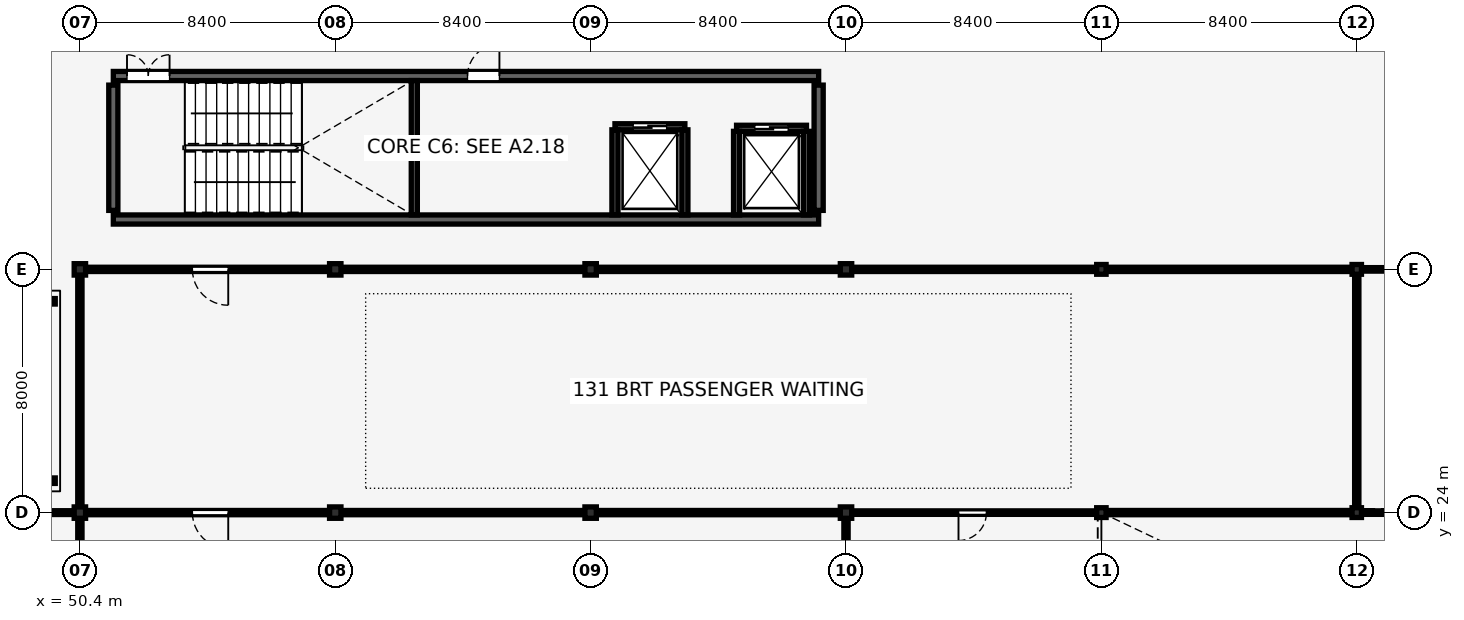
"""IFC4 building model, lengths in metres.
Left out: names, types, materials, properties, quantities, classifications, styles, units other than length and angle.
Written with IfcOpenShell. Run it as: python <this file> out.ifc"""

import sys

from ifc_helpers import new_model, si_unit, direction, frame, frame_2d, origin, origin_2d, place, context, subcontext, project, spatial, rectangle, hollow_rectangle, i_section, extrude, element, fill, save


model = new_model("IFC4")
c1 = context("Model", 3, precision=1e-05, world=origin(), true_north=direction((0.0, 1.0)))
c2 = subcontext(c1, "Body", "Model", "MODEL_VIEW")
j1 = project(units=[si_unit("LENGTHUNIT", "METRE"), si_unit("PLANEANGLEUNIT", "RADIAN")], contexts=[c1])
p1 = place(None, origin())
s1 = spatial("IfcSite", under=j1, at=p1, CompositionType="ELEMENT")
p2 = place(p1, origin())
s2 = spatial("IfcBuilding", under=s1, at=p2, CompositionType="ELEMENT")
p3 = place(p2, frame((0.0, 0.0, 5.44)))
s3 = spatial("IfcBuildingStorey", under=s2, at=p3, CompositionType="ELEMENT", Elevation=5.44)
p4 = place(p3, frame((51.5, 33.64, 0.0), z_axis=(0.0, 0.0, 1.0), x_axis=(1.0, 0.0, 0.0)))
e1 = element("IfcWall", 1, at=p4, inside=s3, PredefinedType="SHEAR", context=c2, shape_type="SweptSolid", body=[
    extrude(rectangle(XDim=23.2, YDim=0.3, at=frame_2d((11.6, 0.0))), origin(), (0.0, 0.0, 1.0), 3.8),
])
p5 = place(p3, frame((51.5, 38.36, 0.0), z_axis=(0.0, 0.0, 1.0), x_axis=(1.0, 0.0, 0.0)))
e2 = element("IfcWall", 2, at=p5, inside=s3, PredefinedType="SHEAR", context=c2, shape_type="SweptSolid", body=[
    extrude(rectangle(XDim=23.2, YDim=0.3, at=frame_2d((11.6, 0.0))), origin(), (0.0, 0.0, 1.0), 3.8),
])
p6 = place(p5, frame((0.45, 0.0, 0.0), z_axis=(0.0, 0.0, 1.0), x_axis=(1.0, 0.0, 0.0)))
e3 = element("IfcOpeningElement", 3, at=p6, cuts=e2, PredefinedType="OPENING", context=c2, shape_type="SweptSolid", body=[
    extrude(rectangle(XDim=1.4, YDim=2.15, at=frame_2d((0.7, 1.075))), frame((0.0, 0.16, 0.0), z_axis=(0.0, -1.0, 0.0), x_axis=(1.0, 0.0, 0.0)), (0.0, 0.0, 1.0), 0.32),
])
p7 = place(p5, frame((11.65, 0.0, 0.0), z_axis=(0.0, 0.0, 1.0), x_axis=(1.0, 0.0, 0.0)))
e4 = element("IfcOpeningElement", 4, at=p7, cuts=e2, PredefinedType="OPENING", context=c2, shape_type="SweptSolid", body=[
    extrude(rectangle(XDim=1.05, YDim=2.15, at=frame_2d((0.525, 1.075))), frame((0.0, 0.16, 0.0), z_axis=(0.0, -1.0, 0.0), x_axis=(1.0, 0.0, 0.0)), (0.0, 0.0, 1.0), 0.32),
])
for number, where, z_axis, x_axis in (
    (5, (51.5, 33.94, 0.0), (0.0, 0.0, 1.0), (0.0, 1.0, 0.0)),
    (6, (74.7, 33.94, 0.0), (0.0, 0.0, 1.0), (0.0, 1.0, 0.0)),
):
    element("IfcWall", number, at=place(p3, frame(where, z_axis=z_axis, x_axis=x_axis)), inside=s3, PredefinedType="SHEAR", context=c2, shape_type="SweptSolid", body=[
        extrude(rectangle(XDim=4.12, YDim=0.3, at=frame_2d((2.06, 0.0))), origin(), (0.0, 0.0, 1.0), 3.8),
    ])
for number, where, z_axis, x_axis in (
    (7, (50.4, 24.0, 0.0), (0.0, 0.0, 1.0), (1.0, 0.0, 0.0)),
    (8, (50.4, 32.0, 0.0), (0.0, 0.0, 1.0), (1.0, 0.0, 0.0)),
    (9, (58.8, 24.0, 0.0), (0.0, 0.0, 1.0), (1.0, 0.0, 0.0)),
    (10, (58.8, 32.0, 0.0), (0.0, 0.0, 1.0), (1.0, 0.0, 0.0)),
    (11, (67.2, 24.0, 0.0), (0.0, 0.0, 1.0), (1.0, 0.0, 0.0)),
    (12, (67.2, 32.0, 0.0), (0.0, 0.0, 1.0), (1.0, 0.0, 0.0)),
    (13, (75.6, 24.0, 0.0), (0.0, 0.0, 1.0), (1.0, 0.0, 0.0)),
    (14, (75.6, 32.0, 0.0), (0.0, 0.0, 1.0), (1.0, 0.0, 0.0)),
):
    element("IfcColumn", number, at=place(p3, frame(where, z_axis=z_axis, x_axis=x_axis)), inside=s3, PredefinedType="COLUMN", context=c2, shape_type="SweptSolid", body=[
        extrude(i_section(OverallWidth=0.375, OverallDepth=0.375, WebThickness=0.017, FlangeThickness=0.027, FilletRadius=0.015, at=origin_2d()), origin(), (0.0, 0.0, 1.0), 3.8),
    ])
for number, where, z_axis, x_axis in (
    (15, (84.0, 24.0, 0.0), (0.0, 0.0, 1.0), (1.0, 0.0, 0.0)),
    (16, (84.0, 32.0, 0.0), (0.0, 0.0, 1.0), (1.0, 0.0, 0.0)),
    (17, (92.4, 24.0, 0.0), (0.0, 0.0, 1.0), (1.0, 0.0, 0.0)),
    (18, (92.4, 32.0, 0.0), (0.0, 0.0, 1.0), (1.0, 0.0, 0.0)),
):
    element("IfcColumn", number, at=place(p3, frame(where, z_axis=z_axis, x_axis=x_axis)), inside=s3, PredefinedType="COLUMN", context=c2, shape_type="SweptSolid", body=[
        extrude(i_section(OverallWidth=0.309, OverallDepth=0.321, WebThickness=0.014, FlangeThickness=0.022, FilletRadius=0.015, at=origin_2d()), origin(), (0.0, 0.0, 1.0), 3.8),
    ])
p8 = place(p3, frame((61.4, 33.79, 0.0), z_axis=(0.0, 0.0, 1.0), x_axis=(0.0, 1.0, 0.0)))
e19 = element("IfcWall", 19, at=p8, inside=s3, PredefinedType="SHEAR", context=c2, shape_type="SweptSolid", body=[
    extrude(rectangle(XDim=4.42, YDim=0.2, at=frame_2d((2.21, 0.0))), origin(), (0.0, 0.0, 1.0), 3.8),
])
p9 = place(p3, frame((68.0, 36.69, 0.0), z_axis=(0.0, 0.0, 1.0), x_axis=(1.0, 0.0, 0.0)))
e20 = element("IfcWall", 20, at=p9, inside=s3, PredefinedType="SHEAR", context=c2, shape_type="SweptSolid", body=[
    extrude(rectangle(XDim=2.3, YDim=0.2, at=frame_2d((1.15, 0.0))), origin(), (0.0, 0.0, 1.0), 3.8),
])
p10 = place(p9, frame((0.6, 0.0, 0.0), z_axis=(0.0, 0.0, 1.0), x_axis=(1.0, 0.0, 0.0)))
e21 = element("IfcOpeningElement", 21, at=p10, cuts=e20, PredefinedType="OPENING", context=c2, shape_type="SweptSolid", body=[
    extrude(rectangle(XDim=1.1, YDim=2.15, at=frame_2d((0.55, 1.075))), frame((0.0, 0.11, 0.0), z_axis=(0.0, -1.0, 0.0), x_axis=(1.0, 0.0, 0.0)), (0.0, 0.0, 1.0), 0.22),
])
for number, where, z_axis, x_axis in (
    (22, (68.0, 33.79, 0.0), (0.0, 0.0, 1.0), (0.0, 1.0, 0.0)),
    (23, (70.3, 33.79, 0.0), (0.0, 0.0, 1.0), (0.0, 1.0, 0.0)),
):
    element("IfcWall", number, at=place(p3, frame(where, z_axis=z_axis, x_axis=x_axis)), inside=s3, PredefinedType="SHEAR", context=c2, shape_type="SweptSolid", body=[
        extrude(rectangle(XDim=2.8, YDim=0.2, at=frame_2d((1.4, 0.0))), origin(), (0.0, 0.0, 1.0), 3.8),
    ])
p11 = place(p3, frame((72.0, 36.64, 0.0), z_axis=(0.0, 0.0, 1.0), x_axis=(1.0, 0.0, 0.0)))
e24 = element("IfcWall", 24, at=p11, inside=s3, PredefinedType="SHEAR", context=c2, shape_type="SweptSolid", body=[
    extrude(rectangle(XDim=2.3, YDim=0.2, at=frame_2d((1.15, 0.0))), origin(), (0.0, 0.0, 1.0), 3.8),
])
p12 = place(p11, frame((0.6, 0.0, 0.0), z_axis=(0.0, 0.0, 1.0), x_axis=(1.0, 0.0, 0.0)))
e25 = element("IfcOpeningElement", 25, at=p12, cuts=e24, PredefinedType="OPENING", context=c2, shape_type="SweptSolid", body=[
    extrude(rectangle(XDim=1.1, YDim=2.15, at=frame_2d((0.55, 1.075))), frame((0.0, 0.11, 0.0), z_axis=(0.0, -1.0, 0.0), x_axis=(1.0, 0.0, 0.0)), (0.0, 0.0, 1.0), 0.22),
])
for number, where, z_axis, x_axis in (
    (26, (72.0, 33.79, 0.0), (0.0, 0.0, 1.0), (0.0, 1.0, 0.0)),
    (27, (74.3, 33.79, 0.0), (0.0, 0.0, 1.0), (0.0, 1.0, 0.0)),
):
    element("IfcWall", number, at=place(p3, frame(where, z_axis=z_axis, x_axis=x_axis)), inside=s3, PredefinedType="SHEAR", context=c2, shape_type="SweptSolid", body=[
        extrude(rectangle(XDim=2.75, YDim=0.2, at=frame_2d((1.375, 0.0))), origin(), (0.0, 0.0, 1.0), 3.8),
    ])
for number, where, z_axis, x_axis in (
    (28, (49.5, 25.05, 0.002), (0.0, 0.0, 1.0), (1.0, 0.0, 0.0)),
    (29, (49.5, 30.95, 0.002), (0.0, 0.0, 1.0), (1.0, 0.0, 0.0)),
):
    element("IfcColumn", number, at=place(p3, frame(where, z_axis=z_axis, x_axis=x_axis)), inside=s3, PredefinedType="COLUMN", context=c2, shape_type="SweptSolid", body=[
        extrude(hollow_rectangle(XDim=0.18, YDim=0.18, WallThickness=0.008, InnerFilletRadius=0.012, OuterFilletRadius=0.02, at=origin_2d()), origin(), (0.0, 0.0, 1.0), 3.794),
    ])
p13 = place(p3, frame((50.577, 32.0, 0.0), z_axis=(0.0, 0.0, 1.0), x_axis=(1.0, 0.0, 0.0)))
e30 = element("IfcWall", 30, at=p13, inside=s3, PredefinedType="PARTITIONING", context=c2, shape_type="SweptSolid", body=[
    extrude(rectangle(XDim=8.045, YDim=0.14, at=frame_2d((4.023, 0.0))), origin(), (0.0, 0.0, 1.0), 3.26),
])
p14 = place(p13, frame((4.703, 0.0, 0.0), z_axis=(0.0, 0.0, 1.0), x_axis=(-1.0, 0.0, 0.0)))
e31 = element("IfcOpeningElement", 31, at=p14, cuts=e30, PredefinedType="OPENING", context=c2, shape_type="SweptSolid", body=[
    extrude(rectangle(XDim=1.18, YDim=2.22, at=frame_2d((0.59, 1.11))), frame((0.0, 0.08, 0.0), z_axis=(0.0, -1.0, 0.0), x_axis=(1.0, 0.0, 0.0)), (0.0, 0.0, 1.0), 0.16),
])
p15 = place(p3, frame((92.545, 32.0, 0.0), z_axis=(0.0, 0.0, 1.0), x_axis=(1.0, 0.0, 0.0)))
e32 = element("IfcWall", 32, at=p15, inside=s3, PredefinedType="PARTITIONING", context=c2, shape_type="SweptSolid", body=[
    extrude(rectangle(XDim=8.111, YDim=0.115, at=frame_2d((4.055, 0.0))), origin(), (0.0, 0.0, 1.0), 3.26),
])
p16 = place(p15, frame((4.475, 0.0, 0.0), z_axis=(0.0, 0.0, 1.0), x_axis=(-1.0, 0.0, 0.0)))
e33 = element("IfcOpeningElement", 33, at=p16, cuts=e32, PredefinedType="OPENING", context=c2, shape_type="SweptSolid", body=[
    extrude(rectangle(XDim=0.92, YDim=2.12, at=frame_2d((0.46, 1.06))), frame((0.0, 0.067, 0.0), z_axis=(0.0, -1.0, 0.0), x_axis=(1.0, 0.0, 0.0)), (0.0, 0.0, 1.0), 0.135),
])
p17 = place(p3, frame((50.577, 24.0, 0.0), z_axis=(0.0, 0.0, 1.0), x_axis=(1.0, 0.0, 0.0)))
e34 = element("IfcWall", 34, at=p17, inside=s3, PredefinedType="PARTITIONING", context=c2, shape_type="SweptSolid", body=[
    extrude(rectangle(XDim=8.045, YDim=0.14, at=frame_2d((4.023, 0.0))), origin(), (0.0, 0.0, 1.0), 3.26),
])
p18 = place(p17, frame((4.703, 0.0, 0.0), z_axis=(0.0, 0.0, 1.0), x_axis=(-1.0, 0.0, 0.0)))
e35 = element("IfcOpeningElement", 35, at=p18, cuts=e34, PredefinedType="OPENING", context=c2, shape_type="SweptSolid", body=[
    extrude(rectangle(XDim=1.18, YDim=2.22, at=frame_2d((0.59, 1.11))), frame((0.0, 0.08, 0.0), z_axis=(0.0, -1.0, 0.0), x_axis=(1.0, 0.0, 0.0)), (0.0, 0.0, 1.0), 0.16),
])
p19 = place(p3, frame((75.777, 24.0, 0.0), z_axis=(0.0, 0.0, 1.0), x_axis=(1.0, 0.0, 0.0)))
e36 = element("IfcWall", 36, at=p19, inside=s3, PredefinedType="PARTITIONING", context=c2, shape_type="SweptSolid", body=[
    extrude(rectangle(XDim=8.078, YDim=0.115, at=frame_2d((4.039, 0.0))), origin(), (0.0, 0.0, 1.0), 3.26),
])
p20 = place(p19, frame((4.443, 0.0, 0.0), z_axis=(0.0, 0.0, 1.0), x_axis=(-1.0, 0.0, 0.0)))
e37 = element("IfcOpeningElement", 37, at=p20, cuts=e36, PredefinedType="OPENING", context=c2, shape_type="SweptSolid", body=[
    extrude(rectangle(XDim=0.92, YDim=2.12, at=frame_2d((0.46, 1.06))), frame((0.0, 0.067, 0.0), z_axis=(0.0, -1.0, 0.0), x_axis=(1.0, 0.0, 0.0)), (0.0, 0.0, 1.0), 0.135),
])
for number, where, z_axis, x_axis in (
    (38, (58.977, 32.0, 0.0), (0.0, 0.0, 1.0), (1.0, 0.0, 0.0)),
    (39, (67.377, 32.0, 0.0), (0.0, 0.0, 1.0), (1.0, 0.0, 0.0)),
):
    element("IfcWall", number, at=place(p3, frame(where, z_axis=z_axis, x_axis=x_axis)), inside=s3, PredefinedType="PARTITIONING", context=c2, shape_type="SweptSolid", body=[
        extrude(rectangle(XDim=8.045, YDim=0.14, at=frame_2d((4.023, 0.0))), origin(), (0.0, 0.0, 1.0), 3.26),
    ])
p21 = place(p3, frame((75.777, 32.0, 0.0), z_axis=(0.0, 0.0, 1.0), x_axis=(1.0, 0.0, 0.0)))
e40 = element("IfcWall", 40, at=p21, inside=s3, PredefinedType="PARTITIONING", context=c2, shape_type="SweptSolid", body=[
    extrude(rectangle(XDim=8.078, YDim=0.14, at=frame_2d((4.039, 0.0))), origin(), (0.0, 0.0, 1.0), 3.26),
])
p22 = place(p3, frame((84.145, 32.0, 0.0), z_axis=(0.0, 0.0, 1.0), x_axis=(1.0, 0.0, 0.0)))
e41 = element("IfcWall", 41, at=p22, inside=s3, PredefinedType="PARTITIONING", context=c2, shape_type="SweptSolid", body=[
    extrude(rectangle(XDim=8.111, YDim=0.14, at=frame_2d((4.055, 0.0))), origin(), (0.0, 0.0, 1.0), 3.26),
])
for number, where, z_axis, x_axis in (
    (42, (58.977, 24.0, 0.0), (0.0, 0.0, 1.0), (1.0, 0.0, 0.0)),
    (43, (67.377, 24.0, 0.0), (0.0, 0.0, 1.0), (1.0, 0.0, 0.0)),
):
    element("IfcWall", number, at=place(p3, frame(where, z_axis=z_axis, x_axis=x_axis)), inside=s3, PredefinedType="PARTITIONING", context=c2, shape_type="SweptSolid", body=[
        extrude(rectangle(XDim=8.045, YDim=0.14, at=frame_2d((4.023, 0.0))), origin(), (0.0, 0.0, 1.0), 3.26),
    ])
p23 = place(p3, frame((84.145, 24.0, 0.0), z_axis=(0.0, 0.0, 1.0), x_axis=(1.0, 0.0, 0.0)))
e44 = element("IfcWall", 44, at=p23, inside=s3, PredefinedType="PARTITIONING", context=c2, shape_type="SweptSolid", body=[
    extrude(rectangle(XDim=8.111, YDim=0.14, at=frame_2d((4.055, 0.0))), origin(), (0.0, 0.0, 1.0), 3.26),
])
p24 = place(p3, frame((50.4, 24.177, 0.0), z_axis=(0.0, 0.0, 1.0), x_axis=(0.0, 1.0, 0.0)))
e45 = element("IfcWall", 45, at=p24, inside=s3, PredefinedType="PARTITIONING", context=c2, shape_type="SweptSolid", body=[
    extrude(rectangle(XDim=7.646, YDim=0.14, at=frame_2d((3.823, 0.0))), origin(), (0.0, 0.0, 1.0), 3.337),
])
p25 = place(p3, frame((92.4, 24.15, 0.0), z_axis=(0.0, 0.0, 1.0), x_axis=(0.0, 1.0, 0.0)))
e46 = element("IfcWall", 46, at=p25, inside=s3, PredefinedType="PARTITIONING", context=c2, shape_type="SweptSolid", body=[
    extrude(rectangle(XDim=7.699, YDim=0.14, at=frame_2d((3.85, 0.0))), origin(), (0.0, 0.0, 1.0), 3.337),
])
p26 = place(p3, frame((92.545, 24.0, 0.0), z_axis=(0.0, 0.0, 1.0), x_axis=(1.0, 0.0, 0.0)))
e47 = element("IfcWall", 47, at=p26, inside=s3, PredefinedType="PARTITIONING", context=c2, shape_type="SweptSolid", body=[
    extrude(rectangle(XDim=8.111, YDim=0.115, at=frame_2d((4.055, 0.0))), origin(), (0.0, 0.0, 1.0), 3.26),
])
p27 = place(p3, frame((50.4, 16.177, 0.0), z_axis=(0.0, 0.0, 1.0), x_axis=(0.0, 1.0, 0.0)))
e48 = element("IfcWall", 48, at=p27, inside=s3, PredefinedType="PARTITIONING", context=c2, shape_type="SweptSolid", body=[
    extrude(rectangle(XDim=7.646, YDim=0.14, at=frame_2d((3.823, 0.0))), origin(), (0.0, 0.0, 1.0), 3.337),
])
p28 = place(p3, frame((75.6, 16.15, 0.0), z_axis=(0.0, 0.0, 1.0), x_axis=(0.0, 1.0, 0.0)))
e49 = element("IfcWall", 49, at=p28, inside=s3, PredefinedType="PARTITIONING", context=c2, shape_type="SweptSolid", body=[
    extrude(rectangle(XDim=7.672, YDim=0.14, at=frame_2d((3.836, 0.0))), origin(), (0.0, 0.0, 1.0), 3.337),
])
p29 = place(p3, frame((42.177, 24.0, 0.0), z_axis=(0.0, 0.0, 1.0), x_axis=(1.0, 0.0, 0.0)))
e50 = element("IfcWall", 50, at=p29, inside=s3, PredefinedType="PARTITIONING", context=c2, shape_type="SweptSolid", body=[
    extrude(rectangle(XDim=8.045, YDim=0.125, at=frame_2d((4.023, 0.0))), origin(), (0.0, 0.0, 1.0), 3.26),
])
p30 = place(p6, origin())
e51 = element("IfcDoor", 51, at=p30, inside=s3, OperationType="DOUBLE_DOOR_SINGLE_SWING", PredefinedType="DOOR", context=c2, shape_type="SweptSolid", body=[
    extrude(rectangle(XDim=1.4, YDim=2.15, at=frame_2d((0.7, 1.075))), frame((0.0, 0.025, 0.0), z_axis=(0.0, -1.0, 0.0), x_axis=(1.0, 0.0, 0.0)), (0.0, 0.0, 1.0), 0.05),
])
fill(e3, e51)
p31 = place(p7, origin())
e52 = element("IfcDoor", 52, at=p31, inside=s3, OperationType="SINGLE_SWING_RIGHT", PredefinedType="DOOR", context=c2, shape_type="SweptSolid", body=[
    extrude(rectangle(XDim=1.05, YDim=2.15, at=frame_2d((0.525, 1.075))), frame((0.0, 0.025, 0.0), z_axis=(0.0, -1.0, 0.0), x_axis=(1.0, 0.0, 0.0)), (0.0, 0.0, 1.0), 0.05),
])
fill(e4, e52)
p32 = place(p10, origin())
e53 = element("IfcDoor", 53, at=p32, inside=s3, OperationType="DOUBLE_DOOR_SLIDING", PredefinedType="DOOR", context=c2, shape_type="SweptSolid", body=[
    extrude(rectangle(XDim=1.1, YDim=2.15, at=frame_2d((0.55, 1.075))), frame((0.0, 0.025, 0.0), z_axis=(0.0, -1.0, 0.0), x_axis=(1.0, 0.0, 0.0)), (0.0, 0.0, 1.0), 0.05),
])
fill(e21, e53)
p33 = place(p12, origin())
e54 = element("IfcDoor", 54, at=p33, inside=s3, OperationType="DOUBLE_DOOR_SLIDING", PredefinedType="DOOR", context=c2, shape_type="SweptSolid", body=[
    extrude(rectangle(XDim=1.1, YDim=2.15, at=frame_2d((0.55, 1.075))), frame((0.0, 0.025, 0.0), z_axis=(0.0, -1.0, 0.0), x_axis=(1.0, 0.0, 0.0)), (0.0, 0.0, 1.0), 0.05),
])
fill(e25, e54)
p34 = place(p14, origin())
e55 = element("IfcDoor", 55, at=p34, inside=s3, OperationType="SINGLE_SWING_LEFT", PredefinedType="DOOR", context=c2, shape_type="SweptSolid", body=[
    extrude(rectangle(XDim=1.18, YDim=2.22, at=frame_2d((0.59, 1.11))), frame((0.0, 0.025, 0.0), z_axis=(0.0, -1.0, 0.0), x_axis=(1.0, 0.0, 0.0)), (0.0, 0.0, 1.0), 0.05),
])
fill(e31, e55)
p35 = place(p18, origin())
e56 = element("IfcDoor", 56, at=p35, inside=s3, OperationType="SINGLE_SWING_LEFT", PredefinedType="DOOR", context=c2, shape_type="SweptSolid", body=[
    extrude(rectangle(XDim=1.18, YDim=2.22, at=frame_2d((0.59, 1.11))), frame((0.0, 0.025, 0.0), z_axis=(0.0, -1.0, 0.0), x_axis=(1.0, 0.0, 0.0)), (0.0, 0.0, 1.0), 0.05),
])
fill(e35, e56)
p36 = place(p20, origin())
e57 = element("IfcDoor", 57, at=p36, inside=s3, OperationType="SINGLE_SWING_RIGHT", PredefinedType="DOOR", context=c2, shape_type="SweptSolid", body=[
    extrude(rectangle(XDim=0.92, YDim=2.12, at=frame_2d((0.46, 1.06))), frame((0.0, 0.025, 0.0), z_axis=(0.0, -1.0, 0.0), x_axis=(1.0, 0.0, 0.0)), (0.0, 0.0, 1.0), 0.05),
])
fill(e37, e57)
save(model, sys.argv[1])
